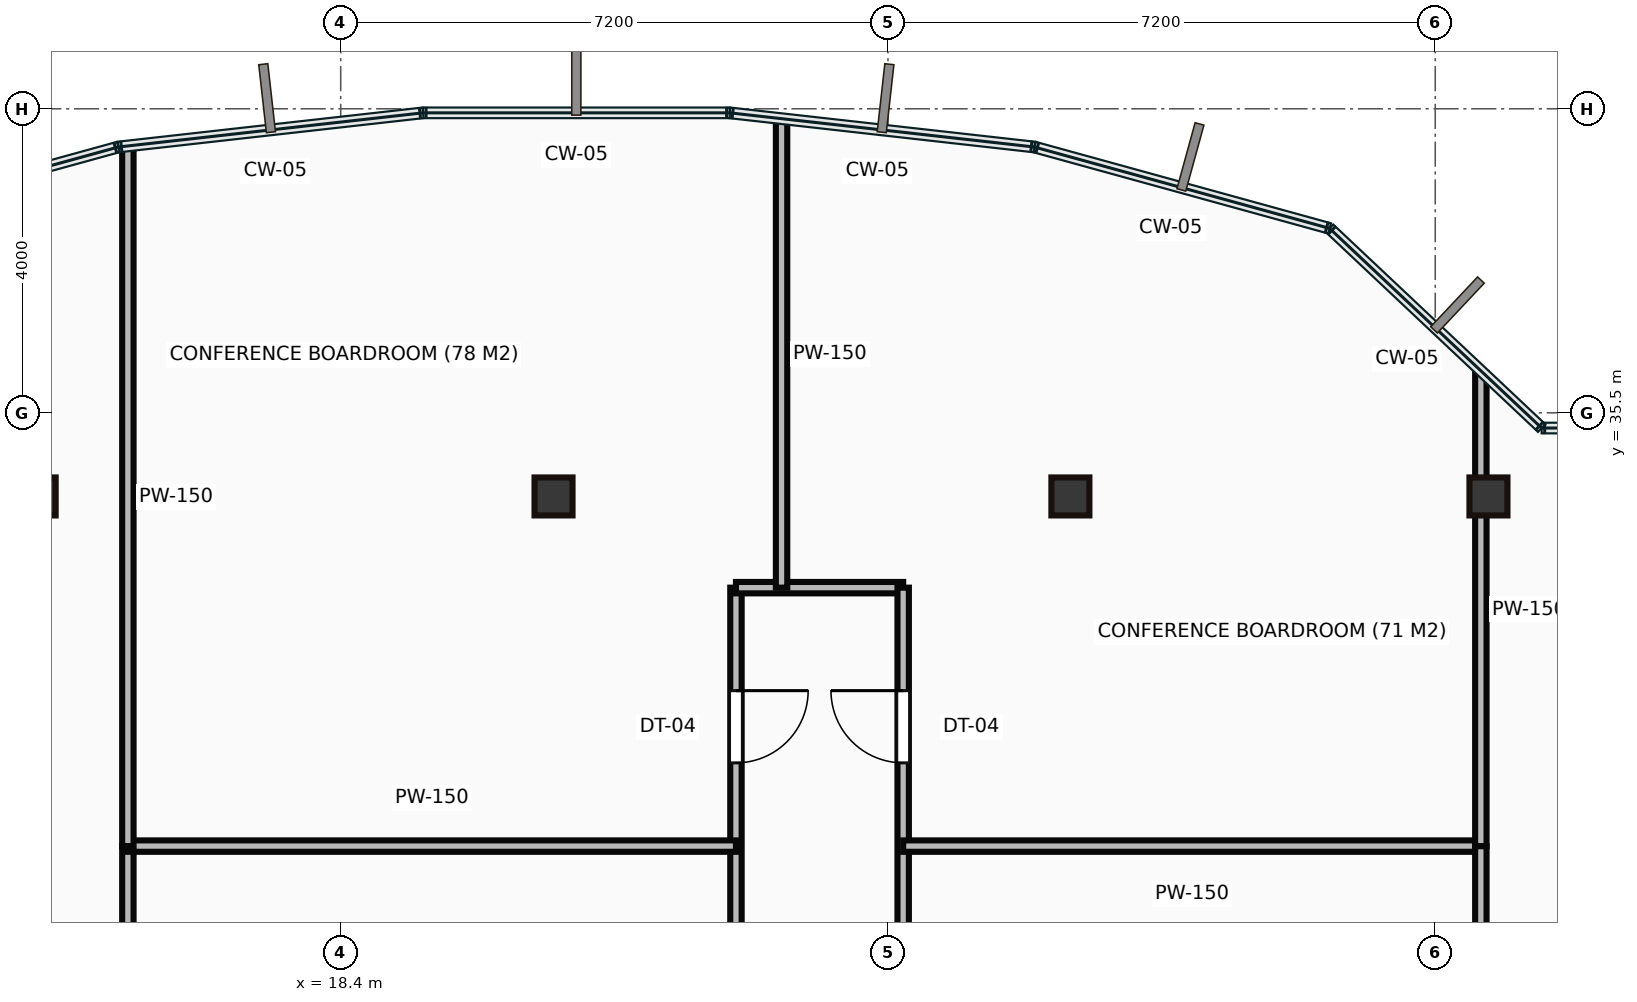
"""IFC4 building model, lengths in metres.
Left out: names, types, materials, properties, quantities, classifications, styles, units other than length and angle.
Written with IfcOpenShell. Run it as: python <this file> out.ifc"""

import sys

from ifc_helpers import new_model, si_unit, direction, frame, frame_2d, origin, origin_2d, place, context, subcontext, project, spatial, rectangle, hollow_rectangle, extrude, source, transform, mapped, element, fill, save


model = new_model("IFC4")
c1 = context("Model", 3, precision=1e-05, world=origin(), true_north=direction((0.0, 1.0)))
c2 = subcontext(c1, "Body", "Model", "MODEL_VIEW")
j1 = project(units=[si_unit("LENGTHUNIT", "METRE"), si_unit("PLANEANGLEUNIT", "RADIAN")], contexts=[c1])
p1 = place(None, origin())
s1 = spatial("IfcSite", under=j1, at=p1, CompositionType="ELEMENT")
p2 = place(p1, origin())
s2 = spatial("IfcBuilding", under=s1, at=p2, CompositionType="ELEMENT")
p3 = place(p2, frame((0.0, 0.0, 195.9)))
s3 = spatial("IfcBuildingStorey", under=s2, at=p3, CompositionType="ELEMENT", Elevation=195.9)
m1 = source(origin(), c2, "Body", "SweptSolid", [
    extrude(hollow_rectangle(XDim=0.5, YDim=0.5, WallThickness=0.022, at=origin_2d()), origin(), (0.0, 0.0, 1.0), 3.65),
])
for number, where, z_axis, x_axis in (
    (1, (14.4, 34.4, 0.0), (0.0, 0.0, 1.0), (1.0, 0.0, 0.0)),
    (2, (21.2, 34.4, 0.0), (0.0, 0.0, 1.0), (1.0, 0.0, 0.0)),
    (3, (28.0, 34.4, 0.0), (0.0, 0.0, 1.0), (1.0, 0.0, 0.0)),
    (4, (33.5, 34.4, 0.0), (0.0, 0.0, 1.0), (1.0, 0.0, 0.0)),
):
    element("IfcColumn", number, at=place(p3, frame(where, z_axis=z_axis, x_axis=x_axis)), inside=s3, PredefinedType="COLUMN", context=c2, shape_type="MappedRepresentation", body=[
        mapped(m1, transform((0.0, 0.0, 0.0))),
    ])
m2 = source(origin(), c2, "Body", "SweptSolid", [
    extrude(rectangle(XDim=13.35, YDim=0.15, at=frame_2d((6.675, 0.0))), origin(), (0.0, 0.0, 1.0), 3.4),
])
p4 = place(p3, frame((23.6, 19.85, 0.0), z_axis=(0.0, 0.0, 1.0), x_axis=(0.0, 1.0, 0.0)))
e5 = element("IfcWall", 5, at=p4, inside=s3, PredefinedType="PARTITIONING", context=c2, shape_type="MappedRepresentation", body=[
    mapped(m2, transform((0.0, 0.0, 0.0))),
])
p5 = place(p4, frame((5.475, 0.0, 0.0)))
e6 = element("IfcOpeningElement", 6, at=p5, cuts=e5, PredefinedType="OPENING", context=c2, shape_type="SweptSolid", body=[
    extrude(rectangle(XDim=0.95, YDim=2.15, at=frame_2d((0.475, 1.075))), frame((0.0, 0.085, 0.0), z_axis=(0.0, -1.0, 0.0), x_axis=(1.0, 0.0, 0.0)), (0.0, 0.0, 1.0), 0.17),
])
p6 = place(p4, frame((11.045, 0.0, 0.0)))
e7 = element("IfcOpeningElement", 7, at=p6, cuts=e5, PredefinedType="OPENING", context=c2, shape_type="SweptSolid", body=[
    extrude(rectangle(XDim=0.95, YDim=2.15, at=frame_2d((0.475, 1.075))), frame((0.0, 0.085, 0.0), z_axis=(0.0, -1.0, 0.0), x_axis=(1.0, 0.0, 0.0)), (0.0, 0.0, 1.0), 0.17),
])
m3 = source(origin(), c2, "Body", "SweptSolid", [
    extrude(rectangle(XDim=2.2, YDim=0.15, at=frame_2d((1.1, 0.0))), origin(), (0.0, 0.0, 1.0), 3.4),
])
p7 = place(p3, frame((23.6, 33.2, 0.0), z_axis=(0.0, 0.0, 1.0), x_axis=(1.0, 0.0, 0.0)))
e8 = element("IfcWall", 8, at=p7, inside=s3, PredefinedType="PARTITIONING", context=c2, shape_type="MappedRepresentation", body=[
    mapped(m3, transform((0.0, 0.0, 0.0))),
])
p8 = place(p3, frame((25.8, 33.2, 0.0), z_axis=(0.0, 0.0, 1.0), x_axis=(0.0, -1.0, 0.0)))
e9 = element("IfcWall", 9, at=p8, inside=s3, PredefinedType="PARTITIONING", context=c2, shape_type="MappedRepresentation", body=[
    mapped(m2, transform((0.0, 0.0, 0.0))),
])
p9 = place(p8, frame((1.355, 0.0, 0.0)))
e10 = element("IfcOpeningElement", 10, at=p9, cuts=e9, PredefinedType="OPENING", context=c2, shape_type="SweptSolid", body=[
    extrude(rectangle(XDim=0.95, YDim=2.15, at=frame_2d((0.475, 1.075))), frame((0.0, 0.085, 0.0), z_axis=(0.0, -1.0, 0.0), x_axis=(1.0, 0.0, 0.0)), (0.0, 0.0, 1.0), 0.17),
])
p10 = place(p8, frame((7.77, 0.0, 0.0)))
e11 = element("IfcOpeningElement", 11, at=p10, cuts=e9, PredefinedType="OPENING", context=c2, shape_type="SweptSolid", body=[
    extrude(rectangle(XDim=0.95, YDim=2.15, at=frame_2d((0.475, 1.075))), frame((0.0, 0.085, 0.0), z_axis=(0.0, -1.0, 0.0), x_axis=(1.0, 0.0, 0.0)), (0.0, 0.0, 1.0), 0.17),
])
m4 = source(origin(), c2, "Body", "SweptSolid", [
    extrude(rectangle(XDim=8.0, YDim=0.15, at=frame_2d((4.0, 0.0))), origin(), (0.0, 0.0, 1.0), 3.4),
])
for number, where, z_axis, x_axis in (
    (12, (15.6, 29.8, 0.0), (0.0, 0.0, 1.0), (0.0, -1.0, 0.0)),
    (13, (15.6, 29.8, 0.0), (0.0, 0.0, 1.0), (1.0, 0.0, 0.0)),
):
    element("IfcWall", number, at=place(p3, frame(where, z_axis=z_axis, x_axis=x_axis)), inside=s3, PredefinedType="PARTITIONING", context=c2, shape_type="MappedRepresentation", body=[
        mapped(m4, transform((0.0, 0.0, 0.0))),
    ])
m5 = source(origin(), c2, "Body", "SweptSolid", [
    extrude(rectangle(XDim=9.191, YDim=0.15, at=frame_2d((4.596, 0.0))), origin(), (0.0, 0.0, 1.0), 3.4),
])
p11 = place(p3, frame((15.6, 38.991, 0.0), z_axis=(0.0, 0.0, 1.0), x_axis=(0.0, -1.0, 0.0)))
e14 = element("IfcWall", 14, at=p11, inside=s3, PredefinedType="PARTITIONING", context=c2, shape_type="MappedRepresentation", body=[
    mapped(m5, transform((0.0, 0.0, 0.0))),
])
m6 = source(origin(), c2, "Body", "SweptSolid", [
    extrude(rectangle(XDim=6.15, YDim=0.15, at=frame_2d((3.075, 0.0))), origin(), (0.0, 0.0, 1.0), 3.4),
])
p12 = place(p3, frame((24.2, 39.35, 0.0), z_axis=(0.0, 0.0, 1.0), x_axis=(0.0, -1.0, 0.0)))
e15 = element("IfcWall", 15, at=p12, inside=s3, PredefinedType="PARTITIONING", context=c2, shape_type="MappedRepresentation", body=[
    mapped(m6, transform((0.0, 0.0, 0.0))),
])
m7 = source(origin(), c2, "Body", "SweptSolid", [
    extrude(rectangle(XDim=7.6, YDim=0.15, at=frame_2d((3.8, 0.0))), origin(), (0.0, 0.0, 1.0), 3.4),
])
p13 = place(p3, frame((33.4, 29.8, 0.0), z_axis=(0.0, 0.0, 1.0), x_axis=(-1.0, 0.0, 0.0)))
e16 = element("IfcWall", 16, at=p13, inside=s3, PredefinedType="PARTITIONING", context=c2, shape_type="MappedRepresentation", body=[
    mapped(m7, transform((0.0, 0.0, 0.0))),
])
m8 = source(origin(), c2, "Body", "SweptSolid", [
    extrude(rectangle(XDim=8.0, YDim=0.15, at=frame_2d((4.0, 0.0))), origin(), (0.0, 0.0, 1.0), 2.787),
])
p14 = place(p3, frame((33.4, 29.8, 0.0), z_axis=(0.0, 0.0, 1.0), x_axis=(0.0, -1.0, 0.0)))
e17 = element("IfcWall", 17, at=p14, inside=s3, PredefinedType="PARTITIONING", context=c2, shape_type="MappedRepresentation", body=[
    mapped(m8, transform((0.0, 0.0, 0.0))),
])
m9 = source(origin(), c2, "Body", "SweptSolid", [
    extrude(rectangle(XDim=6.226, YDim=0.15, at=frame_2d((3.113, 0.0))), origin(), (0.0, 0.0, 1.0), 2.787),
])
p15 = place(p3, frame((33.4, 36.026, 0.0), z_axis=(0.0, 0.0, 1.0), x_axis=(0.0, -1.0, 0.0)))
e18 = element("IfcWall", 18, at=p15, inside=s3, PredefinedType="PARTITIONING", context=c2, shape_type="MappedRepresentation", body=[
    mapped(m9, transform((0.0, 0.0, 0.0))),
])
m10 = source(origin(), c2, "Body", "SweptSolid", [
    extrude(rectangle(XDim=0.95, YDim=2.15, at=frame_2d((0.475, 1.075))), frame((0.0, 0.025, 0.0), z_axis=(0.0, -1.0, 0.0), x_axis=(1.0, 0.0, 0.0)), (0.0, 0.0, 1.0), 0.05),
])
p16 = place(p6, origin())
e19 = element("IfcDoor", 19, at=p16, inside=s3, OperationType="SINGLE_SWING_RIGHT", PredefinedType="DOOR", context=c2, shape_type="MappedRepresentation", body=[
    mapped(m10, transform((0.0, 0.0, 0.0))),
])
fill(e7, e19)
p17 = place(p9, origin())
e20 = element("IfcDoor", 20, at=p17, inside=s3, OperationType="SINGLE_SWING_LEFT", PredefinedType="DOOR", context=c2, shape_type="MappedRepresentation", body=[
    mapped(m10, transform((0.0, 0.0, 0.0))),
])
fill(e10, e20)
save(model, sys.argv[1])
